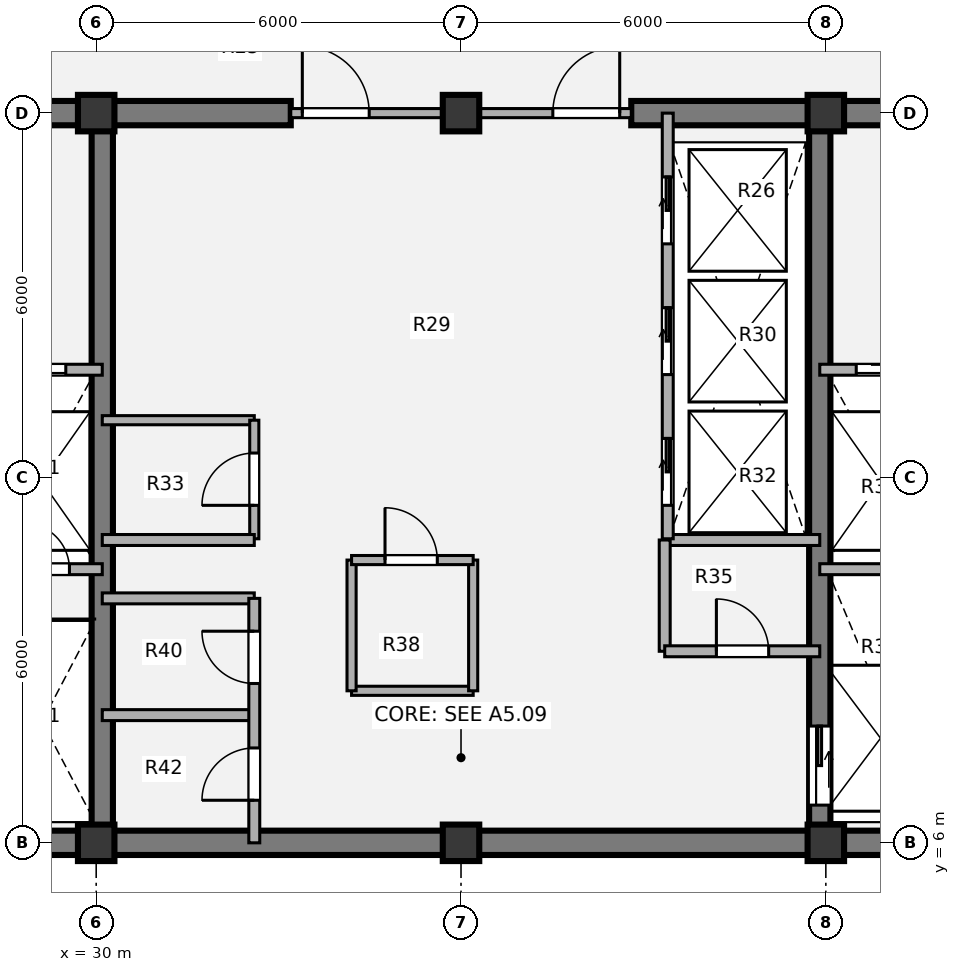
"""IFC4 building model, lengths in metres.
Left out: names, types, materials, properties, quantities, classifications, styles, units other than length and angle.
Written with IfcOpenShell. Run it as: python <this file> out.ifc"""

import sys

from ifc_helpers import new_model, si_unit, direction, frame, frame_2d, origin, origin_2d, place, context, subcontext, project, spatial, rectangle, extrude, source, transform, mapped, element, fill, save


model = new_model("IFC4")
c1 = context("Model", 3, precision=1e-05, world=origin(), true_north=direction((0.0, 1.0)))
c2 = subcontext(c1, "Body", "Model", "MODEL_VIEW")
j1 = project(units=[si_unit("LENGTHUNIT", "METRE"), si_unit("PLANEANGLEUNIT", "RADIAN")], contexts=[c1])
p1 = place(None, origin())
s1 = spatial("IfcSite", under=j1, at=p1, CompositionType="ELEMENT")
p2 = place(p1, origin())
s2 = spatial("IfcBuilding", under=s1, at=p2, CompositionType="ELEMENT")
p3 = place(p2, frame((0.0, 0.0, 268.38)))
s3 = spatial("IfcBuildingStorey", under=s2, at=p3, CompositionType="ELEMENT", Elevation=268.38)
m1 = source(origin(), c2, "Body", "SweptSolid", [
    extrude(rectangle(XDim=0.6, YDim=0.6, at=origin_2d()), origin(), (0.0, 0.0, 1.0), 3.78),
])
for number, where, z_axis, x_axis in (
    (1, (30.0, 6.0, 0.0), (0.0, 0.0, 1.0), (1.0, 0.0, 0.0)),
    (2, (36.0, 6.0, 0.0), (0.0, 0.0, 1.0), (1.0, 0.0, 0.0)),
    (3, (42.0, 6.0, 0.0), (0.0, 0.0, 1.0), (1.0, 0.0, 0.0)),
    (4, (30.0, 18.0, 0.0), (0.0, 0.0, 1.0), (1.0, 0.0, 0.0)),
    (5, (36.0, 18.0, 0.0), (0.0, 0.0, 1.0), (1.0, 0.0, 0.0)),
    (6, (42.0, 18.0, 0.0), (0.0, 0.0, 1.0), (1.0, 0.0, 0.0)),
):
    element("IfcColumn", number, at=place(p3, frame(where, z_axis=z_axis, x_axis=x_axis)), inside=s3, PredefinedType="COLUMN", context=c2, shape_type="MappedRepresentation", body=[
        mapped(m1, transform((0.0, 0.0, 0.0), x_axis=(1.0, 0.0, 0.0), y_axis=(0.0, 1.0, 0.0), z_axis=(0.0, 0.0, 1.0), scale=1.0)),
    ])
p4 = place(p3, frame((48.2, 6.0, 0.0), z_axis=(0.0, 0.0, 1.0), x_axis=(-1.0, 0.0, 0.0)))
e7 = element("IfcWall", 7, at=p4, inside=s3, PredefinedType="SHEAR", context=c2, shape_type="SweptSolid", body=[
    extrude(rectangle(XDim=24.4, YDim=0.4, at=frame_2d((12.2, 0.0))), origin(), (0.0, 0.0, 1.0), 3.78),
])
p5 = place(p3, frame((23.8, 18.0, 0.0), z_axis=(0.0, 0.0, 1.0), x_axis=(1.0, 0.0, 0.0)))
e8 = element("IfcWall", 8, at=p5, inside=s3, PredefinedType="SHEAR", context=c2, shape_type="SweptSolid", body=[
    extrude(rectangle(XDim=9.4, YDim=0.4, at=frame_2d((4.7, 0.0))), origin(), (0.0, 0.0, 1.0), 3.78),
])
p6 = place(p5, frame((2.95, 0.0, 0.0)))
e9 = element("IfcOpeningElement", 9, at=p6, cuts=e8, PredefinedType="OPENING", context=c2, shape_type="SweptSolid", body=[
    extrude(rectangle(XDim=1.1, YDim=2.1, at=origin_2d()), frame((0.55, 0.21, 1.05), z_axis=(0.0, -1.0, 0.0), x_axis=(1.0, 0.0, 0.0)), (0.0, 0.0, 1.0), 0.42),
])
p7 = place(p3, frame((38.8, 18.0, 0.0), z_axis=(0.0, 0.0, 1.0), x_axis=(1.0, 0.0, 0.0)))
e10 = element("IfcWall", 10, at=p7, inside=s3, PredefinedType="SHEAR", context=c2, shape_type="SweptSolid", body=[
    extrude(rectangle(XDim=9.4, YDim=0.4, at=frame_2d((4.7, 0.0))), origin(), (0.0, 0.0, 1.0), 3.78),
])
p8 = place(p7, frame((5.45, 0.0, 0.0)))
e11 = element("IfcOpeningElement", 11, at=p8, cuts=e10, PredefinedType="OPENING", context=c2, shape_type="SweptSolid", body=[
    extrude(rectangle(XDim=1.1, YDim=2.1, at=origin_2d()), frame((0.55, 0.21, 1.05), z_axis=(0.0, -1.0, 0.0), x_axis=(1.0, 0.0, 0.0)), (0.0, 0.0, 1.0), 0.42),
])
p9 = place(p3, frame((30.1, 6.0, 0.0), z_axis=(0.0, 0.0, 1.0), x_axis=(0.0, 1.0, 0.0)))
e12 = element("IfcWall", 12, at=p9, inside=s3, PredefinedType="SHEAR", context=c2, shape_type="SweptSolid", body=[
    extrude(rectangle(XDim=12.0, YDim=0.35, at=frame_2d((6.0, 0.0))), origin(), (0.0, 0.0, 1.0), 3.78),
])
p10 = place(p3, frame((41.9, 18.0, 0.0), z_axis=(0.0, 0.0, 1.0), x_axis=(0.0, -1.0, 0.0)))
e13 = element("IfcWall", 13, at=p10, inside=s3, PredefinedType="SHEAR", context=c2, shape_type="SweptSolid", body=[
    extrude(rectangle(XDim=12.0, YDim=0.35, at=frame_2d((6.0, 0.0))), origin(), (0.0, 0.0, 1.0), 3.78),
])
p11 = place(p10, frame((10.08, 0.0, 0.0)))
e14 = element("IfcOpeningElement", 14, at=p11, cuts=e13, PredefinedType="OPENING", context=c2, shape_type="SweptSolid", body=[
    extrude(rectangle(XDim=1.3, YDim=2.1, at=origin_2d()), frame((0.65, 0.185, 1.05), z_axis=(0.0, -1.0, 0.0), x_axis=(1.0, 0.0, 0.0)), (0.0, 0.0, 1.0), 0.37),
])
p12 = place(p3, frame((30.1, 12.95, 0.0), z_axis=(0.0, 0.0, 1.0), x_axis=(1.0, 0.0, 0.0)))
e15 = element("IfcWall", 15, at=p12, inside=s3, PredefinedType="PARTITIONING", context=c2, shape_type="SweptSolid", body=[
    extrude(rectangle(XDim=2.5, YDim=0.15, at=frame_2d((1.25, 0.0))), origin(), (0.0, 0.0, 1.0), 3.5),
])
p13 = place(p3, frame((32.6, 11.0, 0.0), z_axis=(0.0, 0.0, 1.0), x_axis=(0.0, 1.0, 0.0)))
e16 = element("IfcWall", 16, at=p13, inside=s3, PredefinedType="PARTITIONING", context=c2, shape_type="SweptSolid", body=[
    extrude(rectangle(XDim=1.95, YDim=0.15, at=frame_2d((0.975, 0.0))), origin(), (0.0, 0.0, 1.0), 3.5),
])
p14 = place(p13, frame((0.55, 0.0, 0.0)))
e17 = element("IfcOpeningElement", 17, at=p14, cuts=e16, PredefinedType="OPENING", context=c2, shape_type="SweptSolid", body=[
    extrude(rectangle(XDim=0.86, YDim=2.1, at=origin_2d()), frame((0.43, 0.085, 1.05), z_axis=(0.0, -1.0, 0.0), x_axis=(1.0, 0.0, 0.0)), (0.0, 0.0, 1.0), 0.17),
])
p15 = place(p3, frame((34.2, 8.5, 0.0), z_axis=(0.0, 0.0, 1.0), x_axis=(1.0, 0.0, 0.0)))
e18 = element("IfcWall", 18, at=p15, inside=s3, PredefinedType="PARTITIONING", context=c2, shape_type="SweptSolid", body=[
    extrude(rectangle(XDim=2.0, YDim=0.15, at=frame_2d((1.0, 0.0))), origin(), (0.0, 0.0, 1.0), 3.5),
])
p16 = place(p3, frame((34.2, 8.5, 0.0), z_axis=(0.0, 0.0, 1.0), x_axis=(0.0, 1.0, 0.0)))
e19 = element("IfcWall", 19, at=p16, inside=s3, PredefinedType="PARTITIONING", context=c2, shape_type="SweptSolid", body=[
    extrude(rectangle(XDim=2.15, YDim=0.15, at=frame_2d((1.075, 0.0))), origin(), (0.0, 0.0, 1.0), 3.5),
])
p17 = place(p3, frame((36.2, 8.5, 0.0), z_axis=(0.0, 0.0, 1.0), x_axis=(0.0, 1.0, 0.0)))
e20 = element("IfcWall", 20, at=p17, inside=s3, PredefinedType="PARTITIONING", context=c2, shape_type="SweptSolid", body=[
    extrude(rectangle(XDim=2.15, YDim=0.15, at=frame_2d((1.075, 0.0))), origin(), (0.0, 0.0, 1.0), 2.715),
])
p18 = place(p3, frame((34.2, 10.65, 0.0), z_axis=(0.0, 0.0, 1.0), x_axis=(1.0, 0.0, 0.0)))
e21 = element("IfcWall", 21, at=p18, inside=s3, PredefinedType="PARTITIONING", context=c2, shape_type="SweptSolid", body=[
    extrude(rectangle(XDim=2.0, YDim=0.15, at=frame_2d((1.0, 0.0))), origin(), (0.0, 0.0, 1.0), 3.5),
])
p19 = place(p18, frame((0.55, 0.0, 0.0)))
e22 = element("IfcOpeningElement", 22, at=p19, cuts=e21, PredefinedType="OPENING", context=c2, shape_type="SweptSolid", body=[
    extrude(rectangle(XDim=0.86, YDim=2.1, at=origin_2d()), frame((0.43, 0.085, 1.05), z_axis=(0.0, -1.0, 0.0), x_axis=(1.0, 0.0, 0.0)), (0.0, 0.0, 1.0), 0.17),
])
p20 = place(p3, frame((30.1, 10.98, 0.0), z_axis=(0.0, 0.0, 1.0), x_axis=(1.0, 0.0, 0.0)))
e23 = element("IfcWall", 23, at=p20, inside=s3, PredefinedType="PARTITIONING", context=c2, shape_type="SweptSolid", body=[
    extrude(rectangle(XDim=2.5, YDim=0.18, at=frame_2d((1.25, 0.0))), origin(), (0.0, 0.0, 1.0), 3.5),
])
p21 = place(p3, frame((39.35, 10.98, 0.0), z_axis=(0.0, 0.0, 1.0), x_axis=(1.0, 0.0, 0.0)))
e24 = element("IfcWall", 24, at=p21, inside=s3, PredefinedType="PARTITIONING", context=c2, shape_type="SweptSolid", body=[
    extrude(rectangle(XDim=2.55, YDim=0.18, at=frame_2d((1.275, 0.0))), origin(), (0.0, 0.0, 1.0), 3.5),
])
for number, where, z_axis, x_axis in (
    (25, (30.1, 8.1, 0.0), (0.0, 0.0, 1.0), (1.0, 0.0, 0.0)),
    (26, (30.1, 10.02, 0.0), (0.0, 0.0, 1.0), (1.0, 0.0, 0.0)),
):
    element("IfcWall", number, at=place(p3, frame(where, z_axis=z_axis, x_axis=x_axis)), inside=s3, PredefinedType="PARTITIONING", context=c2, shape_type="SweptSolid", body=[
        extrude(rectangle(XDim=2.5, YDim=0.18, at=frame_2d((1.25, 0.0))), origin(), (0.0, 0.0, 1.0), 3.5),
    ])
p22 = place(p3, frame((32.6, 6.0, 0.0), z_axis=(0.0, 0.0, 1.0), x_axis=(0.0, 1.0, 0.0)))
e27 = element("IfcWall", 27, at=p22, inside=s3, PredefinedType="PARTITIONING", context=c2, shape_type="SweptSolid", body=[
    extrude(rectangle(XDim=4.02, YDim=0.18, at=frame_2d((2.01, 0.0))), origin(), (0.0, 0.0, 1.0), 3.5),
])
p23 = place(p22, frame((0.7, 0.0, 0.0)))
e28 = element("IfcOpeningElement", 28, at=p23, cuts=e27, PredefinedType="OPENING", context=c2, shape_type="SweptSolid", body=[
    extrude(rectangle(XDim=0.86, YDim=2.1, at=origin_2d()), frame((0.43, 0.1, 1.05), z_axis=(0.0, -1.0, 0.0), x_axis=(1.0, 0.0, 0.0)), (0.0, 0.0, 1.0), 0.2),
])
p24 = place(p22, frame((2.62, 0.0, 0.0)))
e29 = element("IfcOpeningElement", 29, at=p24, cuts=e27, PredefinedType="OPENING", context=c2, shape_type="SweptSolid", body=[
    extrude(rectangle(XDim=0.86, YDim=2.1, at=origin_2d()), frame((0.43, 0.1, 1.05), z_axis=(0.0, -1.0, 0.0), x_axis=(1.0, 0.0, 0.0)), (0.0, 0.0, 1.0), 0.2),
])
p25 = place(p3, frame((39.35, 9.15, 0.0), z_axis=(0.0, 0.0, 1.0), x_axis=(0.0, 1.0, 0.0)))
e30 = element("IfcWall", 30, at=p25, inside=s3, PredefinedType="PARTITIONING", context=c2, shape_type="SweptSolid", body=[
    extrude(rectangle(XDim=1.83, YDim=0.18, at=frame_2d((0.915, 0.0))), origin(), (0.0, 0.0, 1.0), 3.5),
])
p26 = place(p3, frame((39.35, 9.15, 0.0), z_axis=(0.0, 0.0, 1.0), x_axis=(1.0, 0.0, 0.0)))
e31 = element("IfcWall", 31, at=p26, inside=s3, PredefinedType="PARTITIONING", context=c2, shape_type="SweptSolid", body=[
    extrude(rectangle(XDim=2.55, YDim=0.18, at=frame_2d((1.275, 0.0))), origin(), (0.0, 0.0, 1.0), 3.5),
])
p27 = place(p26, frame((0.85, 0.0, 0.0)))
e32 = element("IfcOpeningElement", 32, at=p27, cuts=e31, PredefinedType="OPENING", context=c2, shape_type="SweptSolid", body=[
    extrude(rectangle(XDim=0.86, YDim=2.1, at=origin_2d()), frame((0.43, 0.1, 1.05), z_axis=(0.0, -1.0, 0.0), x_axis=(1.0, 0.0, 0.0)), (0.0, 0.0, 1.0), 0.2),
])
p28 = place(p3, frame((33.2, 18.0, 0.0), z_axis=(0.0, 0.0, 1.0), x_axis=(1.0, 0.0, 0.0)))
e33 = element("IfcWall", 33, at=p28, inside=s3, PredefinedType="PARTITIONING", context=c2, shape_type="SweptSolid", body=[
    extrude(rectangle(XDim=5.6, YDim=0.15, at=frame_2d((2.8, 0.0))), origin(), (0.0, 0.0, 1.0), 2.515),
])
p29 = place(p28, frame((0.19, 0.0, 0.0)))
e34 = element("IfcOpeningElement", 34, at=p29, cuts=e33, PredefinedType="OPENING", context=c2, shape_type="SweptSolid", body=[
    extrude(rectangle(XDim=1.1, YDim=2.1, at=origin_2d()), frame((0.55, 0.085, 1.05), z_axis=(0.0, -1.0, 0.0), x_axis=(1.0, 0.0, 0.0)), (0.0, 0.0, 1.0), 0.17),
])
p30 = place(p28, frame((4.31, 0.0, 0.0)))
e35 = element("IfcOpeningElement", 35, at=p30, cuts=e33, PredefinedType="OPENING", context=c2, shape_type="SweptSolid", body=[
    extrude(rectangle(XDim=1.1, YDim=2.1, at=origin_2d()), frame((0.55, 0.085, 1.05), z_axis=(0.0, -1.0, 0.0), x_axis=(1.0, 0.0, 0.0)), (0.0, 0.0, 1.0), 0.17),
])
p31 = place(p3, frame((24.0, 13.78, 0.0), z_axis=(0.0, 0.0, 1.0), x_axis=(1.0, 0.0, 0.0)))
e36 = element("IfcWall", 36, at=p31, inside=s3, PredefinedType="PARTITIONING", context=c2, shape_type="SweptSolid", body=[
    extrude(rectangle(XDim=6.1, YDim=0.18, at=frame_2d((3.05, 0.0))), origin(), (0.0, 0.0, 1.0), 3.5),
])
p32 = place(p31, frame((1.15, 0.0, 0.0)))
e37 = element("IfcOpeningElement", 37, at=p32, cuts=e36, PredefinedType="OPENING", context=c2, shape_type="SweptSolid", body=[
    extrude(rectangle(XDim=1.1, YDim=2.1, at=origin_2d()), frame((0.55, 0.1, 1.05), z_axis=(0.0, -1.0, 0.0), x_axis=(1.0, 0.0, 0.0)), (0.0, 0.0, 1.0), 0.2),
])
p33 = place(p31, frame((4.4, 0.0, 0.0)))
e38 = element("IfcOpeningElement", 38, at=p33, cuts=e36, PredefinedType="OPENING", context=c2, shape_type="SweptSolid", body=[
    extrude(rectangle(XDim=1.1, YDim=2.1, at=origin_2d()), frame((0.55, 0.1, 1.05), z_axis=(0.0, -1.0, 0.0), x_axis=(1.0, 0.0, 0.0)), (0.0, 0.0, 1.0), 0.2),
])
p34 = place(p3, frame((28.15, 10.5, 0.0), z_axis=(0.0, 0.0, 1.0), x_axis=(1.0, 0.0, 0.0)))
e39 = element("IfcWall", 39, at=p34, inside=s3, PredefinedType="PARTITIONING", context=c2, shape_type="SweptSolid", body=[
    extrude(rectangle(XDim=1.95, YDim=0.18, at=frame_2d((0.975, 0.0))), origin(), (0.0, 0.0, 1.0), 3.5),
])
p35 = place(p34, frame((0.65, 0.0, 0.0)))
e40 = element("IfcOpeningElement", 40, at=p35, cuts=e39, PredefinedType="OPENING", context=c2, shape_type="SweptSolid", body=[
    extrude(rectangle(XDim=0.76, YDim=2.05, at=origin_2d()), frame((0.38, 0.1, 1.025), z_axis=(0.0, -1.0, 0.0), x_axis=(1.0, 0.0, 0.0)), (0.0, 0.0, 1.0), 0.2),
])
p36 = place(p3, frame((41.9, 13.78, 0.0), z_axis=(0.0, 0.0, 1.0), x_axis=(1.0, 0.0, 0.0)))
e41 = element("IfcWall", 41, at=p36, inside=s3, PredefinedType="PARTITIONING", context=c2, shape_type="SweptSolid", body=[
    extrude(rectangle(XDim=6.1, YDim=0.18, at=frame_2d((3.05, 0.0))), origin(), (0.0, 0.0, 1.0), 3.5),
])
p37 = place(p36, frame((0.6, 0.0, 0.0)))
e42 = element("IfcOpeningElement", 42, at=p37, cuts=e41, PredefinedType="OPENING", context=c2, shape_type="SweptSolid", body=[
    extrude(rectangle(XDim=1.1, YDim=2.1, at=origin_2d()), frame((0.55, 0.1, 1.05), z_axis=(0.0, -1.0, 0.0), x_axis=(1.0, 0.0, 0.0)), (0.0, 0.0, 1.0), 0.2),
])
p38 = place(p36, frame((3.8, 0.0, 0.0)))
e43 = element("IfcOpeningElement", 43, at=p38, cuts=e41, PredefinedType="OPENING", context=c2, shape_type="SweptSolid", body=[
    extrude(rectangle(XDim=1.1, YDim=2.1, at=origin_2d()), frame((0.55, 0.1, 1.05), z_axis=(0.0, -1.0, 0.0), x_axis=(1.0, 0.0, 0.0)), (0.0, 0.0, 1.0), 0.2),
])
p39 = place(p3, frame((41.9, 10.5, 0.0), z_axis=(0.0, 0.0, 1.0), x_axis=(1.0, 0.0, 0.0)))
e44 = element("IfcWall", 44, at=p39, inside=s3, PredefinedType="PARTITIONING", context=c2, shape_type="SweptSolid", body=[
    extrude(rectangle(XDim=1.95, YDim=0.18, at=frame_2d((0.975, 0.0))), origin(), (0.0, 0.0, 1.0), 3.5),
])
p40 = place(p3, frame((39.4, 11.0, 0.0), z_axis=(0.0, 0.0, 1.0), x_axis=(0.0, 1.0, 0.0)))
e45 = element("IfcWall", 45, at=p40, inside=s3, PredefinedType="PARTITIONING", context=c2, shape_type="SweptSolid", body=[
    extrude(rectangle(XDim=7.0, YDim=0.18, at=frame_2d((3.5, 0.0))), origin(), (0.0, 0.0, 1.0), 3.5),
])
p41 = place(p40, frame((0.55, 0.0, 0.0)))
e46 = element("IfcOpeningElement", 46, at=p41, cuts=e45, PredefinedType="OPENING", context=c2, shape_type="SweptSolid", body=[
    extrude(rectangle(XDim=1.1, YDim=2.1, at=origin_2d()), frame((0.55, 0.1, 1.05), z_axis=(0.0, -1.0, 0.0), x_axis=(1.0, 0.0, 0.0)), (0.0, 0.0, 1.0), 0.2),
])
p42 = place(p40, frame((2.7, 0.0, 0.0)))
e47 = element("IfcOpeningElement", 47, at=p42, cuts=e45, PredefinedType="OPENING", context=c2, shape_type="SweptSolid", body=[
    extrude(rectangle(XDim=1.1, YDim=2.1, at=origin_2d()), frame((0.55, 0.1, 1.05), z_axis=(0.0, -1.0, 0.0), x_axis=(1.0, 0.0, 0.0)), (0.0, 0.0, 1.0), 0.2),
])
p43 = place(p40, frame((4.85, 0.0, 0.0)))
e48 = element("IfcOpeningElement", 48, at=p43, cuts=e45, PredefinedType="OPENING", context=c2, shape_type="SweptSolid", body=[
    extrude(rectangle(XDim=1.1, YDim=2.1, at=origin_2d()), frame((0.55, 0.1, 1.05), z_axis=(0.0, -1.0, 0.0), x_axis=(1.0, 0.0, 0.0)), (0.0, 0.0, 1.0), 0.2),
])
m2 = source(origin(), c2, "Body", "SweptSolid", [
    extrude(rectangle(XDim=0.86, YDim=2.1, at=origin_2d()), frame((0.43, 0.025, 1.05), z_axis=(0.0, -1.0, 0.0), x_axis=(1.0, 0.0, 0.0)), (0.0, 0.0, 1.0), 0.05),
])
p44 = place(p14, origin())
e49 = element("IfcDoor", 49, at=p44, inside=s3, OperationType="SINGLE_SWING_LEFT", PredefinedType="DOOR", context=c2, shape_type="MappedRepresentation", body=[
    mapped(m2, transform((0.0, 0.0, 0.0), x_axis=(1.0, 0.0, 0.0), y_axis=(0.0, 1.0, 0.0), z_axis=(0.0, 0.0, 1.0), scale=1.0)),
])
fill(e17, e49)
p45 = place(p19, origin())
e50 = element("IfcDoor", 50, at=p45, inside=s3, OperationType="SINGLE_SWING_LEFT", PredefinedType="DOOR", context=c2, shape_type="MappedRepresentation", body=[
    mapped(m2, transform((0.0, 0.0, 0.0), x_axis=(1.0, 0.0, 0.0), y_axis=(0.0, 1.0, 0.0), z_axis=(0.0, 0.0, 1.0), scale=1.0)),
])
fill(e22, e50)
p46 = place(p23, origin())
e51 = element("IfcDoor", 51, at=p46, inside=s3, OperationType="SINGLE_SWING_LEFT", PredefinedType="DOOR", context=c2, shape_type="MappedRepresentation", body=[
    mapped(m2, transform((0.0, 0.0, 0.0), x_axis=(1.0, 0.0, 0.0), y_axis=(0.0, 1.0, 0.0), z_axis=(0.0, 0.0, 1.0), scale=1.0)),
])
fill(e28, e51)
p47 = place(p24, origin())
e52 = element("IfcDoor", 52, at=p47, inside=s3, OperationType="SINGLE_SWING_RIGHT", PredefinedType="DOOR", context=c2, shape_type="MappedRepresentation", body=[
    mapped(m2, transform((0.0, 0.0, 0.0), x_axis=(1.0, 0.0, 0.0), y_axis=(0.0, 1.0, 0.0), z_axis=(0.0, 0.0, 1.0), scale=1.0)),
])
fill(e29, e52)
p48 = place(p27, origin())
e53 = element("IfcDoor", 53, at=p48, inside=s3, OperationType="SINGLE_SWING_LEFT", PredefinedType="DOOR", context=c2, shape_type="MappedRepresentation", body=[
    mapped(m2, transform((0.0, 0.0, 0.0), x_axis=(1.0, 0.0, 0.0), y_axis=(0.0, 1.0, 0.0), z_axis=(0.0, 0.0, 1.0), scale=1.0)),
])
fill(e32, e53)
m3 = source(origin(), c2, "Body", "SweptSolid", [
    extrude(rectangle(XDim=1.1, YDim=2.1, at=origin_2d()), frame((0.55, 0.025, 1.05), z_axis=(0.0, -1.0, 0.0), x_axis=(1.0, 0.0, 0.0)), (0.0, 0.0, 1.0), 0.05),
])
p49 = place(p29, origin())
e54 = element("IfcDoor", 54, at=p49, inside=s3, OperationType="SINGLE_SWING_LEFT", PredefinedType="DOOR", context=c2, shape_type="MappedRepresentation", body=[
    mapped(m3, transform((0.0, 0.0, 0.0), x_axis=(1.0, 0.0, 0.0), y_axis=(0.0, 1.0, 0.0), z_axis=(0.0, 0.0, 1.0), scale=1.0)),
])
fill(e34, e54)
p50 = place(p30, origin())
e55 = element("IfcDoor", 55, at=p50, inside=s3, OperationType="SINGLE_SWING_RIGHT", PredefinedType="DOOR", context=c2, shape_type="MappedRepresentation", body=[
    mapped(m3, transform((0.0, 0.0, 0.0), x_axis=(1.0, 0.0, 0.0), y_axis=(0.0, 1.0, 0.0), z_axis=(0.0, 0.0, 1.0), scale=1.0)),
])
fill(e35, e55)
m4 = source(origin(), c2, "Body", "SweptSolid", [
    extrude(rectangle(XDim=1.1, YDim=2.1, at=origin_2d()), frame((0.55, 0.025, 1.05), z_axis=(0.0, -1.0, 0.0), x_axis=(1.0, 0.0, 0.0)), (0.0, 0.0, 1.0), 0.05),
])
p51 = place(p33, origin())
e56 = element("IfcDoor", 56, at=p51, inside=s3, OperationType="SLIDING_TO_LEFT", PredefinedType="DOOR", context=c2, shape_type="MappedRepresentation", body=[
    mapped(m4, transform((0.0, 0.0, 0.0), x_axis=(1.0, 0.0, 0.0), y_axis=(0.0, 1.0, 0.0), z_axis=(0.0, 0.0, 1.0), scale=1.0)),
])
fill(e38, e56)
m5 = source(origin(), c2, "Body", "SweptSolid", [
    extrude(rectangle(XDim=0.76, YDim=2.05, at=origin_2d()), frame((0.38, 0.025, 1.025), z_axis=(0.0, -1.0, 0.0), x_axis=(1.0, 0.0, 0.0)), (0.0, 0.0, 1.0), 0.05),
])
p52 = place(p35, origin())
e57 = element("IfcDoor", 57, at=p52, inside=s3, OperationType="SINGLE_SWING_LEFT", PredefinedType="DOOR", context=c2, shape_type="MappedRepresentation", body=[
    mapped(m5, transform((0.0, 0.0, 0.0), x_axis=(1.0, 0.0, 0.0), y_axis=(0.0, 1.0, 0.0), z_axis=(0.0, 0.0, 1.0), scale=1.0)),
])
fill(e40, e57)
p53 = place(p37, origin())
e58 = element("IfcDoor", 58, at=p53, inside=s3, OperationType="SLIDING_TO_RIGHT", PredefinedType="DOOR", context=c2, shape_type="MappedRepresentation", body=[
    mapped(m4, transform((0.0, 0.0, 0.0), x_axis=(1.0, 0.0, 0.0), y_axis=(0.0, 1.0, 0.0), z_axis=(0.0, 0.0, 1.0), scale=1.0)),
])
fill(e42, e58)
m6 = source(origin(), c2, "Body", "SweptSolid", [
    extrude(rectangle(XDim=1.3, YDim=2.1, at=origin_2d()), frame((0.65, 0.025, 1.05), z_axis=(0.0, -1.0, 0.0), x_axis=(1.0, 0.0, 0.0)), (0.0, 0.0, 1.0), 0.05),
])
p54 = place(p11, origin())
e59 = element("IfcDoor", 59, at=p54, inside=s3, OperationType="SLIDING_TO_LEFT", PredefinedType="DOOR", context=c2, shape_type="MappedRepresentation", body=[
    mapped(m6, transform((0.0, 0.0, 0.0), x_axis=(1.0, 0.0, 0.0), y_axis=(0.0, 1.0, 0.0), z_axis=(0.0, 0.0, 1.0), scale=1.0)),
])
fill(e14, e59)
p55 = place(p41, origin())
e60 = element("IfcDoor", 60, at=p55, inside=s3, OperationType="SLIDING_TO_RIGHT", PredefinedType="DOOR", context=c2, shape_type="MappedRepresentation", body=[
    mapped(m4, transform((0.0, 0.0, 0.0), x_axis=(1.0, 0.0, 0.0), y_axis=(0.0, 1.0, 0.0), z_axis=(0.0, 0.0, 1.0), scale=1.0)),
])
fill(e46, e60)
p56 = place(p42, origin())
e61 = element("IfcDoor", 61, at=p56, inside=s3, OperationType="SLIDING_TO_RIGHT", PredefinedType="DOOR", context=c2, shape_type="MappedRepresentation", body=[
    mapped(m4, transform((0.0, 0.0, 0.0), x_axis=(1.0, 0.0, 0.0), y_axis=(0.0, 1.0, 0.0), z_axis=(0.0, 0.0, 1.0), scale=1.0)),
])
fill(e47, e61)
p57 = place(p43, origin())
e62 = element("IfcDoor", 62, at=p57, inside=s3, OperationType="SLIDING_TO_RIGHT", PredefinedType="DOOR", context=c2, shape_type="MappedRepresentation", body=[
    mapped(m4, transform((0.0, 0.0, 0.0), x_axis=(1.0, 0.0, 0.0), y_axis=(0.0, 1.0, 0.0), z_axis=(0.0, 0.0, 1.0), scale=1.0)),
])
fill(e48, e62)
save(model, sys.argv[1])
